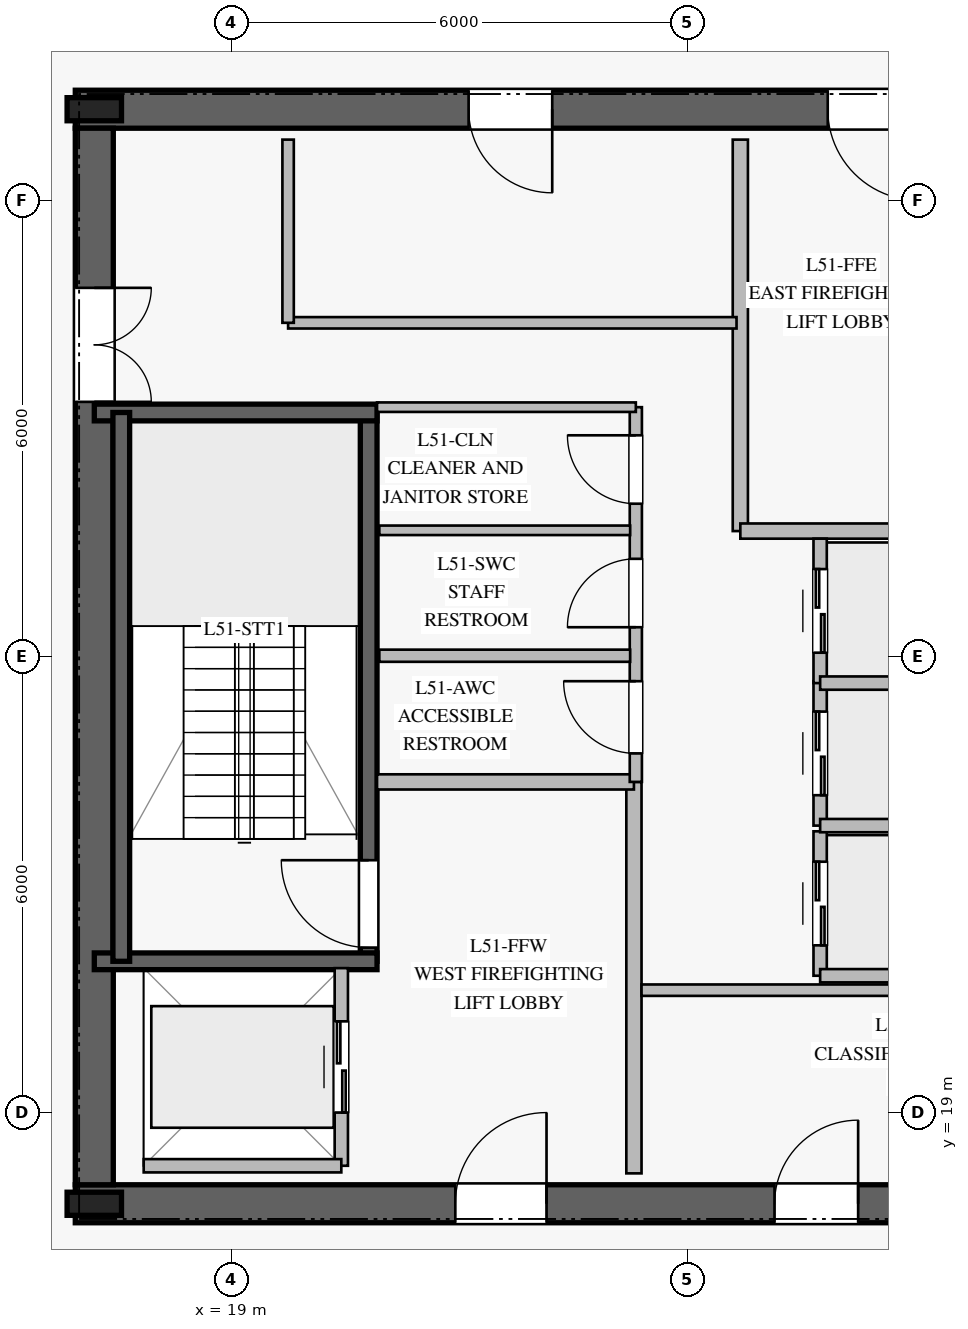
"""IFC4 building model, lengths in metres.
Left out: names, types, materials, properties, quantities, classifications, styles, units other than length and angle.
Written with IfcOpenShell. Run it as: python <this file> out.ifc"""

import sys

from ifc_helpers import new_model, si_unit, direction, frame, frame_2d, origin, origin_2d, place, context, subcontext, project, spatial, rectangle, i_section, extrude, element, fill, save


model = new_model("IFC4")
c1 = context("Model", 3, precision=1e-05, world=origin(), true_north=direction((0.0, 1.0)))
c2 = subcontext(c1, "Body", "Model", "MODEL_VIEW")
j1 = project(units=[si_unit("LENGTHUNIT", "METRE"), si_unit("PLANEANGLEUNIT", "RADIAN")], contexts=[c1])
p1 = place(None, origin())
s1 = spatial("IfcSite", under=j1, at=p1, CompositionType="ELEMENT")
p2 = place(p1, origin())
s2 = spatial("IfcBuilding", under=s1, at=p2, CompositionType="ELEMENT")
p3 = place(p2, frame((0.0, 0.0, 212.8)))
s3 = spatial("IfcBuildingStorey", under=s2, at=p3, CompositionType="ELEMENT", Elevation=212.8)
p4 = place(p3, frame((16.95, 17.8, 0.0), z_axis=(0.0, 0.0, 1.0), x_axis=(1.0, 0.0, 0.0)))
e1 = element("IfcWall", 1, at=p4, inside=s3, PredefinedType="SHEAR", context=c2, shape_type="SweptSolid", body=[
    extrude(rectangle(XDim=16.1, YDim=0.5, at=frame_2d((8.05, 0.0))), origin(), (0.0, 0.0, 1.0), 3.78),
])
p5 = place(p4, frame((5.0, 0.0, 0.0)))
e2 = element("IfcOpeningElement", 2, at=p5, cuts=e1, PredefinedType="OPENING", context=c2, shape_type="SweptSolid", body=[
    extrude(rectangle(XDim=1.2, YDim=2.25, at=frame_2d((0.6, 1.125))), frame((0.0, 0.26, 0.0), z_axis=(0.0, -1.0, 0.0), x_axis=(1.0, 0.0, 0.0)), (0.0, 0.0, 1.0), 0.52),
])
p6 = place(p4, frame((13.95, 0.0, 0.0)))
e3 = element("IfcOpeningElement", 3, at=p6, cuts=e1, PredefinedType="OPENING", context=c2, shape_type="SweptSolid", body=[
    extrude(rectangle(XDim=0.9, YDim=2.1, at=frame_2d((0.45, 1.05))), frame((0.0, 0.26, 0.0), z_axis=(0.0, -1.0, 0.0), x_axis=(1.0, 0.0, 0.0)), (0.0, 0.0, 1.0), 0.52),
])
p7 = place(p4, frame((9.2, 0.0, 0.0)))
e4 = element("IfcOpeningElement", 4, at=p7, cuts=e1, PredefinedType="OPENING", context=c2, shape_type="SweptSolid", body=[
    extrude(rectangle(XDim=1.1, YDim=2.2, at=frame_2d((0.55, 1.1))), frame((0.0, 0.26, 0.0), z_axis=(0.0, -1.0, 0.0), x_axis=(1.0, 0.0, 0.0)), (0.0, 0.0, 1.0), 0.52),
])
p8 = place(p3, frame((33.05, 32.2, 0.0), z_axis=(0.0, 0.0, 1.0), x_axis=(-1.0, 0.0, 0.0)))
e5 = element("IfcWall", 5, at=p8, inside=s3, PredefinedType="SHEAR", context=c2, shape_type="SweptSolid", body=[
    extrude(rectangle(XDim=16.1, YDim=0.5, at=frame_2d((8.05, 0.0))), origin(), (0.0, 0.0, 1.0), 3.78),
])
p9 = place(p8, frame((5.0, 0.0, 0.0)))
e6 = element("IfcOpeningElement", 6, at=p9, cuts=e5, PredefinedType="OPENING", context=c2, shape_type="SweptSolid", body=[
    extrude(rectangle(XDim=1.2, YDim=2.25, at=frame_2d((0.6, 1.125))), frame((0.0, 0.26, 0.0), z_axis=(0.0, -1.0, 0.0), x_axis=(1.0, 0.0, 0.0)), (0.0, 0.0, 1.0), 0.52),
])
p10 = place(p8, frame((9.825, 0.0, 0.0)))
e7 = element("IfcOpeningElement", 7, at=p10, cuts=e5, PredefinedType="OPENING", context=c2, shape_type="SweptSolid", body=[
    extrude(rectangle(XDim=1.1, YDim=2.2, at=frame_2d((0.55, 1.1))), frame((0.0, 0.26, 0.0), z_axis=(0.0, -1.0, 0.0), x_axis=(1.0, 0.0, 0.0)), (0.0, 0.0, 1.0), 0.52),
])
p11 = place(p3, frame((17.2, 31.95, 0.0), z_axis=(0.0, 0.0, 1.0), x_axis=(0.0, -1.0, 0.0)))
e8 = element("IfcWall", 8, at=p11, inside=s3, PredefinedType="SHEAR", context=c2, shape_type="SweptSolid", body=[
    extrude(rectangle(XDim=13.9, YDim=0.5, at=frame_2d((6.95, 0.0))), origin(), (0.0, 0.0, 1.0), 3.78),
])
p12 = place(p11, frame((2.1, 0.0, 0.0)))
e9 = element("IfcOpeningElement", 9, at=p12, cuts=e8, PredefinedType="OPENING", context=c2, shape_type="SweptSolid", body=[
    extrude(rectangle(XDim=1.5, YDim=2.2, at=frame_2d((0.75, 1.1))), frame((0.0, 0.26, 0.0), z_axis=(0.0, -1.0, 0.0), x_axis=(1.0, 0.0, 0.0)), (0.0, 0.0, 1.0), 0.52),
])
for number, where, z_axis, x_axis in (
    (10, (17.2, 17.8, 0.0), (0.0, 0.0, 1.0), (1.0, 0.0, 0.0)),
    (11, (17.2, 32.2, 0.0), (0.0, 0.0, 1.0), (1.0, 0.0, 0.0)),
):
    element("IfcColumn", number, at=place(p3, frame(where, z_axis=z_axis, x_axis=x_axis)), inside=s3, PredefinedType="COLUMN", context=c2, shape_type="SweptSolid", body=[
        extrude(i_section(OverallWidth=0.304, OverallDepth=0.716, WebThickness=0.021, FlangeThickness=0.04, at=origin_2d()), origin(), (0.0, 0.0, 1.0), 4.0),
    ])
p13 = place(p3, frame((20.81, 20.99, 0.0), z_axis=(0.0, 0.0, 1.0), x_axis=(0.0, 1.0, 0.0)))
e12 = element("IfcWall", 12, at=p13, inside=s3, PredefinedType="SOLIDWALL", context=c2, shape_type="SweptSolid", body=[
    extrude(rectangle(XDim=7.22, YDim=0.22, at=frame_2d((3.61, 0.0))), origin(), (0.0, 0.0, 1.0), 3.78),
])
p14 = place(p13, frame((0.18, 0.0, 0.0)))
e13 = element("IfcOpeningElement", 13, at=p14, cuts=e12, PredefinedType="OPENING", context=c2, shape_type="SweptSolid", body=[
    extrude(rectangle(XDim=1.15, YDim=2.2, at=frame_2d((0.575, 1.1))), frame((0.0, 0.12, 0.0), z_axis=(0.0, -1.0, 0.0), x_axis=(1.0, 0.0, 0.0)), (0.0, 0.0, 1.0), 0.24),
])
for number, where, z_axis, x_axis in (
    (14, (17.2, 20.99, 0.0), (0.0, 0.0, 1.0), (1.0, 0.0, 0.0)),
    (15, (17.2, 28.21, 0.0), (0.0, 0.0, 1.0), (1.0, 0.0, 0.0)),
):
    element("IfcWall", number, at=place(p3, frame(where, z_axis=z_axis, x_axis=x_axis)), inside=s3, PredefinedType="SOLIDWALL", context=c2, shape_type="SweptSolid", body=[
        extrude(rectangle(XDim=3.72, YDim=0.22, at=frame_2d((1.86, 0.0))), origin(), (0.0, 0.0, 1.0), 3.78),
    ])
p15 = place(p3, frame((17.555, 28.21, 0.0), z_axis=(0.0, 0.0, 1.0), x_axis=(0.0, -1.0, 0.0)))
e16 = element("IfcWall", 16, at=p15, inside=s3, PredefinedType="SOLIDWALL", context=c2, shape_type="SweptSolid", body=[
    extrude(rectangle(XDim=7.22, YDim=0.22, at=frame_2d((3.61, 0.0))), origin(), (0.0, 0.0, 1.0), 3.78),
])
p16 = place(p3, frame((24.3, 18.2, 0.0), z_axis=(0.0, 0.0, 1.0), x_axis=(0.0, 1.0, 0.0)))
e17 = element("IfcWall", 17, at=p16, inside=s3, PredefinedType="PARTITIONING", context=c2, shape_type="SweptSolid", body=[
    extrude(rectangle(XDim=5.15, YDim=0.2, at=frame_2d((2.575, 0.0))), origin(), (0.0, 0.0, 1.0), 3.78),
])
p17 = place(p3, frame((20.92, 23.35, 0.0), z_axis=(0.0, 0.0, 1.0), x_axis=(1.0, 0.0, 0.0)))
e18 = element("IfcWall", 18, at=p17, inside=s3, PredefinedType="PARTITIONING", context=c2, shape_type="SweptSolid", body=[
    extrude(rectangle(XDim=3.38, YDim=0.2, at=frame_2d((1.69, 0.0))), origin(), (0.0, 0.0, 1.0), 3.78),
])
p18 = place(p3, frame((25.7, 26.65, 0.0), z_axis=(0.0, 0.0, 1.0), x_axis=(0.0, 1.0, 0.0)))
e19 = element("IfcWall", 19, at=p18, inside=s3, PredefinedType="PARTITIONING", context=c2, shape_type="SweptSolid", body=[
    extrude(rectangle(XDim=5.15, YDim=0.2, at=frame_2d((2.575, 0.0))), origin(), (0.0, 0.0, 1.0), 3.78),
])
p19 = place(p3, frame((25.7, 26.65, 0.0), z_axis=(0.0, 0.0, 1.0), x_axis=(1.0, 0.0, 0.0)))
e20 = element("IfcWall", 20, at=p19, inside=s3, PredefinedType="PARTITIONING", context=c2, shape_type="SweptSolid", body=[
    extrude(rectangle(XDim=3.38, YDim=0.2, at=frame_2d((1.69, 0.0))), origin(), (0.0, 0.0, 1.0), 3.78),
])
p20 = place(p3, frame((24.325, 23.35, 0.0), z_axis=(0.0, 0.0, 1.0), x_axis=(0.0, 1.0, 0.0)))
e21 = element("IfcWall", 21, at=p20, inside=s3, PredefinedType="PLUMBINGWALL", context=c2, shape_type="SweptSolid", body=[
    extrude(rectangle(XDim=4.93, YDim=0.16, at=frame_2d((2.465, 0.0))), origin(), (0.0, 0.0, 1.0), 3.78),
])
p21 = place(p20, frame((0.375, 0.0, 0.0)))
e22 = element("IfcOpeningElement", 22, at=p21, cuts=e21, PredefinedType="OPENING", context=c2, shape_type="SweptSolid", body=[
    extrude(rectangle(XDim=0.95, YDim=2.1, at=frame_2d((0.475, 1.05))), frame((0.0, 0.09, 0.0), z_axis=(0.0, -1.0, 0.0), x_axis=(1.0, 0.0, 0.0)), (0.0, 0.0, 1.0), 0.18),
])
p22 = place(p20, frame((2.035, 0.0, 0.0)))
e23 = element("IfcOpeningElement", 23, at=p22, cuts=e21, PredefinedType="OPENING", context=c2, shape_type="SweptSolid", body=[
    extrude(rectangle(XDim=0.9, YDim=2.1, at=frame_2d((0.45, 1.05))), frame((0.0, 0.09, 0.0), z_axis=(0.0, -1.0, 0.0), x_axis=(1.0, 0.0, 0.0)), (0.0, 0.0, 1.0), 0.18),
])
p23 = place(p20, frame((3.66, 0.0, 0.0)))
e24 = element("IfcOpeningElement", 24, at=p23, cuts=e21, PredefinedType="OPENING", context=c2, shape_type="SweptSolid", body=[
    extrude(rectangle(XDim=0.9, YDim=2.1, at=frame_2d((0.45, 1.05))), frame((0.0, 0.09, 0.0), z_axis=(0.0, -1.0, 0.0), x_axis=(1.0, 0.0, 0.0)), (0.0, 0.0, 1.0), 0.18),
])
p24 = place(p3, frame((20.92, 28.28, 0.0), z_axis=(0.0, 0.0, 1.0), x_axis=(1.0, 0.0, 0.0)))
e25 = element("IfcWall", 25, at=p24, inside=s3, PredefinedType="PARTITIONING", context=c2, shape_type="SweptSolid", body=[
    extrude(rectangle(XDim=3.405, YDim=0.125, at=frame_2d((1.703, 0.0))), origin(), (0.0, 0.0, 1.0), 3.78),
])
p25 = place(p3, frame((20.95, 25.01, 0.0), z_axis=(0.0, 0.0, 1.0), x_axis=(1.0, 0.0, 0.0)))
e26 = element("IfcWall", 26, at=p25, inside=s3, PredefinedType="PLUMBINGWALL", context=c2, shape_type="SweptSolid", body=[
    extrude(rectangle(XDim=3.3, YDim=0.16, at=frame_2d((1.65, 0.0))), origin(), (0.0, 0.0, 1.0), 3.78),
])
p26 = place(p3, frame((20.95, 26.66, 0.0), z_axis=(0.0, 0.0, 1.0), x_axis=(1.0, 0.0, 0.0)))
e27 = element("IfcWall", 27, at=p26, inside=s3, PredefinedType="PARTITIONING", context=c2, shape_type="SweptSolid", body=[
    extrude(rectangle(XDim=3.3, YDim=0.125, at=frame_2d((1.65, 0.0))), origin(), (0.0, 0.0, 1.0), 3.78),
])
p27 = place(p3, frame((24.4, 20.61, 0.0), z_axis=(0.0, 0.0, 1.0), x_axis=(1.0, 0.0, 0.0)))
e28 = element("IfcWall", 28, at=p27, inside=s3, PredefinedType="PARTITIONING", context=c2, shape_type="SweptSolid", body=[
    extrude(rectangle(XDim=5.9, YDim=0.15, at=frame_2d((2.95, 0.0))), origin(), (0.0, 0.0, 1.0), 3.78),
])
p28 = place(p3, frame((19.75, 29.39, 0.0), z_axis=(0.0, 0.0, 1.0), x_axis=(1.0, 0.0, 0.0)))
e29 = element("IfcWall", 29, at=p28, inside=s3, PredefinedType="PARTITIONING", context=c2, shape_type="SweptSolid", body=[
    extrude(rectangle(XDim=5.9, YDim=0.15, at=frame_2d((2.95, 0.0))), origin(), (0.0, 0.0, 1.0), 3.78),
])
p29 = place(p3, frame((19.75, 29.39, 0.0), z_axis=(0.0, 0.0, 1.0), x_axis=(0.0, 1.0, 0.0)))
e30 = element("IfcWall", 30, at=p29, inside=s3, PredefinedType="PARTITIONING", context=c2, shape_type="SweptSolid", body=[
    extrude(rectangle(XDim=2.41, YDim=0.15, at=frame_2d((1.205, 0.0))), origin(), (0.0, 0.0, 1.0), 3.78),
])
p30 = place(p3, frame((26.75, 20.8, 0.0), z_axis=(0.0, 0.0, 1.0), x_axis=(0.0, 1.0, 0.0)))
e31 = element("IfcWall", 31, at=p30, inside=s3, PredefinedType="PARTITIONING", context=c2, shape_type="SweptSolid", body=[
    extrude(rectangle(XDim=1.9, YDim=0.175, at=frame_2d((0.95, 0.0))), origin(), (0.0, 0.0, 1.0), 3.78),
])
p31 = place(p30, frame((0.4, 0.0, 0.0)))
e32 = element("IfcOpeningElement", 32, at=p31, cuts=e31, PredefinedType="OPENING", context=c2, shape_type="SweptSolid", body=[
    extrude(rectangle(XDim=1.1, YDim=2.2, at=frame_2d((0.55, 1.1))), frame((0.0, 0.098, 0.0), z_axis=(0.0, -1.0, 0.0), x_axis=(1.0, 0.0, 0.0)), (0.0, 0.0, 1.0), 0.195),
])
p32 = place(p3, frame((26.75, 20.8, 0.0), z_axis=(0.0, 0.0, 1.0), x_axis=(1.0, 0.0, 0.0)))
e33 = element("IfcWall", 33, at=p32, inside=s3, PredefinedType="PARTITIONING", context=c2, shape_type="SweptSolid", body=[
    extrude(rectangle(XDim=2.35, YDim=0.175, at=frame_2d((1.175, 0.0))), origin(), (0.0, 0.0, 1.0), 3.78),
])
p33 = place(p3, frame((26.75, 22.775, 0.0), z_axis=(0.0, 0.0, 1.0), x_axis=(0.0, 1.0, 0.0)))
e34 = element("IfcWall", 34, at=p33, inside=s3, PredefinedType="PARTITIONING", context=c2, shape_type="SweptSolid", body=[
    extrude(rectangle(XDim=1.9, YDim=0.175, at=frame_2d((0.95, 0.0))), origin(), (0.0, 0.0, 1.0), 3.78),
])
p34 = place(p33, frame((0.4, 0.0, 0.0)))
e35 = element("IfcOpeningElement", 35, at=p34, cuts=e34, PredefinedType="OPENING", context=c2, shape_type="SweptSolid", body=[
    extrude(rectangle(XDim=1.1, YDim=2.2, at=frame_2d((0.55, 1.1))), frame((0.0, 0.098, 0.0), z_axis=(0.0, -1.0, 0.0), x_axis=(1.0, 0.0, 0.0)), (0.0, 0.0, 1.0), 0.195),
])
p35 = place(p3, frame((26.75, 22.775, 0.0), z_axis=(0.0, 0.0, 1.0), x_axis=(1.0, 0.0, 0.0)))
e36 = element("IfcWall", 36, at=p35, inside=s3, PredefinedType="PARTITIONING", context=c2, shape_type="SweptSolid", body=[
    extrude(rectangle(XDim=2.35, YDim=0.175, at=frame_2d((1.175, 0.0))), origin(), (0.0, 0.0, 1.0), 3.78),
])
p36 = place(p3, frame((26.75, 24.65, 0.0), z_axis=(0.0, 0.0, 1.0), x_axis=(0.0, 1.0, 0.0)))
e37 = element("IfcWall", 37, at=p36, inside=s3, PredefinedType="PARTITIONING", context=c2, shape_type="SweptSolid", body=[
    extrude(rectangle(XDim=1.9, YDim=0.175, at=frame_2d((0.95, 0.0))), origin(), (0.0, 0.0, 1.0), 3.78),
])
p37 = place(p36, frame((0.4, 0.0, 0.0)))
e38 = element("IfcOpeningElement", 38, at=p37, cuts=e37, PredefinedType="OPENING", context=c2, shape_type="SweptSolid", body=[
    extrude(rectangle(XDim=1.1, YDim=2.2, at=frame_2d((0.55, 1.1))), frame((0.0, 0.098, 0.0), z_axis=(0.0, -1.0, 0.0), x_axis=(1.0, 0.0, 0.0)), (0.0, 0.0, 1.0), 0.195),
])
p38 = place(p3, frame((26.75, 24.65, 0.0), z_axis=(0.0, 0.0, 1.0), x_axis=(1.0, 0.0, 0.0)))
e39 = element("IfcWall", 39, at=p38, inside=s3, PredefinedType="PARTITIONING", context=c2, shape_type="SweptSolid", body=[
    extrude(rectangle(XDim=2.35, YDim=0.175, at=frame_2d((1.175, 0.0))), origin(), (0.0, 0.0, 1.0), 3.78),
])
p39 = place(p3, frame((20.45, 18.3, 0.0), z_axis=(0.0, 0.0, 1.0), x_axis=(0.0, 1.0, 0.0)))
e40 = element("IfcWall", 40, at=p39, inside=s3, PredefinedType="PARTITIONING", context=c2, shape_type="SweptSolid", body=[
    extrude(rectangle(XDim=2.6, YDim=0.175, at=frame_2d((1.3, 0.0))), origin(), (0.0, 0.0, 1.0), 3.78),
])
p40 = place(p39, frame((0.7, 0.0, 0.0)))
e41 = element("IfcOpeningElement", 41, at=p40, cuts=e40, PredefinedType="OPENING", context=c2, shape_type="SweptSolid", body=[
    extrude(rectangle(XDim=1.2, YDim=2.2, at=frame_2d((0.6, 1.1))), frame((0.0, 0.098, 0.0), z_axis=(0.0, -1.0, 0.0), x_axis=(1.0, 0.0, 0.0)), (0.0, 0.0, 1.0), 0.195),
])
p41 = place(p3, frame((17.85, 18.3, 0.0), z_axis=(0.0, 0.0, 1.0), x_axis=(1.0, 0.0, 0.0)))
e42 = element("IfcWall", 42, at=p41, inside=s3, PredefinedType="PARTITIONING", context=c2, shape_type="SweptSolid", body=[
    extrude(rectangle(XDim=2.6, YDim=0.175, at=frame_2d((1.3, 0.0))), origin(), (0.0, 0.0, 1.0), 3.78),
])
p42 = place(p14, origin())
e43 = element("IfcDoor", 43, at=p42, inside=s3, OperationType="SINGLE_SWING_RIGHT", PredefinedType="DOOR", context=c2, shape_type="SweptSolid", body=[
    extrude(rectangle(XDim=1.15, YDim=2.2, at=frame_2d((0.575, 1.1))), frame((0.0, 0.025, 0.0), z_axis=(0.0, -1.0, 0.0), x_axis=(1.0, 0.0, 0.0)), (0.0, 0.0, 1.0), 0.05),
])
fill(e13, e43)
p43 = place(p5, origin())
e44 = element("IfcDoor", 44, at=p43, inside=s3, OperationType="SINGLE_SWING_RIGHT", PredefinedType="DOOR", context=c2, shape_type="SweptSolid", body=[
    extrude(rectangle(XDim=1.2, YDim=2.25, at=frame_2d((0.6, 1.125))), frame((0.0, 0.025, 0.0), z_axis=(0.0, -1.0, 0.0), x_axis=(1.0, 0.0, 0.0)), (0.0, 0.0, 1.0), 0.05),
])
fill(e2, e44)
p44 = place(p9, origin())
e45 = element("IfcDoor", 45, at=p44, inside=s3, OperationType="SINGLE_SWING_LEFT", PredefinedType="DOOR", context=c2, shape_type="SweptSolid", body=[
    extrude(rectangle(XDim=1.2, YDim=2.25, at=frame_2d((0.6, 1.125))), frame((0.0, 0.025, 0.0), z_axis=(0.0, -1.0, 0.0), x_axis=(1.0, 0.0, 0.0)), (0.0, 0.0, 1.0), 0.05),
])
fill(e6, e45)
p45 = place(p12, origin())
e46 = element("IfcDoor", 46, at=p45, inside=s3, OperationType="DOUBLE_DOOR_SINGLE_SWING", PredefinedType="DOOR", context=c2, shape_type="SweptSolid", body=[
    extrude(rectangle(XDim=1.5, YDim=2.2, at=frame_2d((0.75, 1.1))), frame((0.0, 0.025, 0.0), z_axis=(0.0, -1.0, 0.0), x_axis=(1.0, 0.0, 0.0)), (0.0, 0.0, 1.0), 0.05),
])
fill(e9, e46)
p46 = place(p21, origin())
e47 = element("IfcDoor", 47, at=p46, inside=s3, OperationType="SINGLE_SWING_RIGHT", PredefinedType="DOOR", context=c2, shape_type="SweptSolid", body=[
    extrude(rectangle(XDim=0.95, YDim=2.1, at=frame_2d((0.475, 1.05))), frame((0.0, 0.025, 0.0), z_axis=(0.0, -1.0, 0.0), x_axis=(1.0, 0.0, 0.0)), (0.0, 0.0, 1.0), 0.05),
])
fill(e22, e47)
p47 = place(p22, origin())
e48 = element("IfcDoor", 48, at=p47, inside=s3, OperationType="SINGLE_SWING_LEFT", PredefinedType="DOOR", context=c2, shape_type="SweptSolid", body=[
    extrude(rectangle(XDim=0.9, YDim=2.1, at=frame_2d((0.45, 1.05))), frame((0.0, 0.025, 0.0), z_axis=(0.0, -1.0, 0.0), x_axis=(1.0, 0.0, 0.0)), (0.0, 0.0, 1.0), 0.05),
])
fill(e23, e48)
p48 = place(p23, origin())
e49 = element("IfcDoor", 49, at=p48, inside=s3, OperationType="SINGLE_SWING_RIGHT", PredefinedType="DOOR", context=c2, shape_type="SweptSolid", body=[
    extrude(rectangle(XDim=0.9, YDim=2.1, at=frame_2d((0.45, 1.05))), frame((0.0, 0.025, 0.0), z_axis=(0.0, -1.0, 0.0), x_axis=(1.0, 0.0, 0.0)), (0.0, 0.0, 1.0), 0.05),
])
fill(e24, e49)
p49 = place(p7, origin())
e50 = element("IfcDoor", 50, at=p49, inside=s3, OperationType="SINGLE_SWING_RIGHT", PredefinedType="DOOR", context=c2, shape_type="SweptSolid", body=[
    extrude(rectangle(XDim=1.1, YDim=2.2, at=frame_2d((0.55, 1.1))), frame((0.0, 0.025, 0.0), z_axis=(0.0, -1.0, 0.0), x_axis=(1.0, 0.0, 0.0)), (0.0, 0.0, 1.0), 0.05),
])
fill(e4, e50)
p50 = place(p10, origin())
e51 = element("IfcDoor", 51, at=p50, inside=s3, OperationType="SINGLE_SWING_LEFT", PredefinedType="DOOR", context=c2, shape_type="SweptSolid", body=[
    extrude(rectangle(XDim=1.1, YDim=2.2, at=frame_2d((0.55, 1.1))), frame((0.0, 0.025, 0.0), z_axis=(0.0, -1.0, 0.0), x_axis=(1.0, 0.0, 0.0)), (0.0, 0.0, 1.0), 0.05),
])
fill(e7, e51)
p51 = place(p31, origin())
e52 = element("IfcDoor", 52, at=p51, inside=s3, OperationType="DOUBLE_DOOR_SLIDING", PredefinedType="DOOR", context=c2, shape_type="SweptSolid", body=[
    extrude(rectangle(XDim=1.1, YDim=2.2, at=frame_2d((0.55, 1.1))), frame((0.0, 0.025, 0.0), z_axis=(0.0, -1.0, 0.0), x_axis=(1.0, 0.0, 0.0)), (0.0, 0.0, 1.0), 0.05),
])
fill(e32, e52)
p52 = place(p34, origin())
e53 = element("IfcDoor", 53, at=p52, inside=s3, OperationType="DOUBLE_DOOR_SLIDING", PredefinedType="DOOR", context=c2, shape_type="SweptSolid", body=[
    extrude(rectangle(XDim=1.1, YDim=2.2, at=frame_2d((0.55, 1.1))), frame((0.0, 0.025, 0.0), z_axis=(0.0, -1.0, 0.0), x_axis=(1.0, 0.0, 0.0)), (0.0, 0.0, 1.0), 0.05),
])
fill(e35, e53)
p53 = place(p37, origin())
e54 = element("IfcDoor", 54, at=p53, inside=s3, OperationType="DOUBLE_DOOR_SLIDING", PredefinedType="DOOR", context=c2, shape_type="SweptSolid", body=[
    extrude(rectangle(XDim=1.1, YDim=2.2, at=frame_2d((0.55, 1.1))), frame((0.0, 0.025, 0.0), z_axis=(0.0, -1.0, 0.0), x_axis=(1.0, 0.0, 0.0)), (0.0, 0.0, 1.0), 0.05),
])
fill(e38, e54)
p54 = place(p40, origin())
e55 = element("IfcDoor", 55, at=p54, inside=s3, OperationType="DOUBLE_DOOR_SLIDING", PredefinedType="DOOR", context=c2, shape_type="SweptSolid", body=[
    extrude(rectangle(XDim=1.2, YDim=2.2, at=frame_2d((0.6, 1.1))), frame((0.0, 0.025, 0.0), z_axis=(0.0, -1.0, 0.0), x_axis=(1.0, 0.0, 0.0)), (0.0, 0.0, 1.0), 0.05),
])
fill(e41, e55)
save(model, sys.argv[1])
